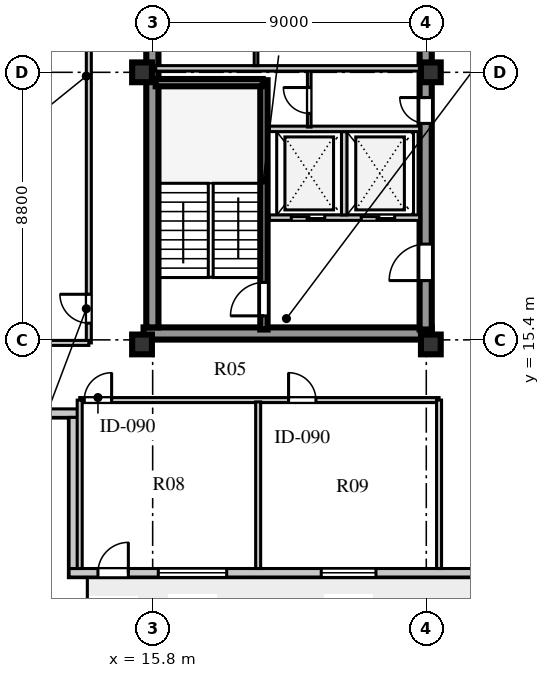
"""IFC4 building model, lengths in metres.
Left out: names, types, materials, properties, quantities, classifications, styles, units other than length and angle.
Written with IfcOpenShell. Run it as: python <this file> out.ifc"""

import sys

from ifc_helpers import new_model, si_unit, direction, frame, frame_2d, origin, origin_2d, place, context, subcontext, project, spatial, rectangle, extrude, element, fill, save


model = new_model("IFC4")
c1 = context("Model", 3, precision=1e-05, world=origin(), true_north=direction((0.0, 1.0)))
c2 = subcontext(c1, "Body", "Model", "MODEL_VIEW")
j1 = project(units=[si_unit("LENGTHUNIT", "METRE"), si_unit("PLANEANGLEUNIT", "RADIAN")], contexts=[c1])
p1 = place(None, origin())
s1 = spatial("IfcSite", under=j1, at=p1, CompositionType="ELEMENT")
p2 = place(p1, origin())
s2 = spatial("IfcBuilding", under=s1, at=p2, CompositionType="ELEMENT")
p3 = place(p2, frame((0.0, 0.0, 253.1)))
s3 = spatial("IfcBuildingStorey", under=s2, at=p3, CompositionType="ELEMENT", Elevation=253.1)
p4 = place(p3, frame((15.5, 15.61, 0.0), z_axis=(0.0, 0.0, 1.0), x_axis=(1.0, 0.0, 0.0)))
e1 = element("IfcWall", 1, at=p4, inside=s3, PredefinedType="SHEAR", context=c2, shape_type="SweptSolid", body=[
    extrude(rectangle(XDim=9.48, YDim=0.4, at=frame_2d((4.74, 0.0))), origin(), (0.0, 0.0, 1.0), 3.66),
])
p5 = place(p3, frame((15.79, 15.81, 0.0), z_axis=(0.0, 0.0, 1.0), x_axis=(0.0, 1.0, 0.0)))
e2 = element("IfcWall", 2, at=p5, inside=s3, PredefinedType="SHEAR", context=c2, shape_type="SweptSolid", body=[
    extrude(rectangle(XDim=25.63, YDim=0.4, at=frame_2d((12.815, 0.0))), origin(), (0.0, 0.0, 1.0), 3.66),
])
p6 = place(p3, frame((24.78, 15.74, 0.0), z_axis=(0.0, 0.0, 1.0), x_axis=(0.0, 1.0, 0.0)))
e3 = element("IfcWall", 3, at=p6, inside=s3, PredefinedType="SHEAR", context=c2, shape_type="SweptSolid", body=[
    extrude(rectangle(XDim=25.76, YDim=0.4, at=frame_2d((12.88, 0.0))), origin(), (0.0, 0.0, 1.0), 3.66),
])
p7 = place(p6, frame((1.61, 0.0, 0.0)))
e4 = element("IfcOpeningElement", 4, at=p7, cuts=e3, PredefinedType="OPENING", context=c2, shape_type="SweptSolid", body=[
    extrude(rectangle(XDim=1.2, YDim=2.1, at=frame_2d((0.6, 1.05))), frame((0.0, 0.21, 0.0), z_axis=(0.0, -1.0, 0.0), x_axis=(1.0, 0.0, 0.0)), (0.0, 0.0, 1.0), 0.42),
])
p8 = place(p6, frame((6.78, 0.0, 0.0)))
e5 = element("IfcOpeningElement", 5, at=p8, cuts=e3, PredefinedType="OPENING", context=c2, shape_type="SweptSolid", body=[
    extrude(rectangle(XDim=0.85, YDim=2.06, at=frame_2d((0.425, 1.03))), frame((0.0, 0.21, 0.0), z_axis=(0.0, -1.0, 0.0), x_axis=(1.0, 0.0, 0.0)), (0.0, 0.0, 1.0), 0.42),
])
p9 = place(p6, frame((12.11, 0.0, 0.0)))
e6 = element("IfcOpeningElement", 6, at=p9, cuts=e3, PredefinedType="OPENING", context=c2, shape_type="SweptSolid", body=[
    extrude(rectangle(XDim=1.5, YDim=2.12, at=frame_2d((0.75, 1.06))), frame((0.0, 0.21, 0.0), z_axis=(0.0, -1.0, 0.0), x_axis=(1.0, 0.0, 0.0)), (0.0, 0.0, 1.0), 0.42),
])
p10 = place(p6, frame((20.11, 0.0, 0.0)))
e7 = element("IfcOpeningElement", 7, at=p10, cuts=e3, PredefinedType="OPENING", context=c2, shape_type="SweptSolid", body=[
    extrude(rectangle(XDim=1.2, YDim=2.12, at=frame_2d((0.6, 1.06))), frame((0.0, 0.21, 0.0), z_axis=(0.0, -1.0, 0.0), x_axis=(1.0, 0.0, 0.0)), (0.0, 0.0, 1.0), 0.42),
])
p11 = place(p6, frame((24.01, 0.0, 0.0)))
e8 = element("IfcOpeningElement", 8, at=p11, cuts=e3, PredefinedType="OPENING", context=c2, shape_type="SweptSolid", body=[
    extrude(rectangle(XDim=0.95, YDim=2.1, at=frame_2d((0.475, 1.05))), frame((0.0, 0.21, 0.0), z_axis=(0.0, -1.0, 0.0), x_axis=(1.0, 0.0, 0.0)), (0.0, 0.0, 1.0), 0.42),
])
for number, where, z_axis, x_axis in (
    (9, (15.45, 15.25, 0.0), (0.0, 0.0, 1.0), (1.0, 0.0, 0.0)),
    (10, (15.45, 24.2, 0.0), (0.0, 0.0, 1.0), (1.0, 0.0, 0.0)),
    (11, (24.95, 15.25, 0.0), (0.0, 0.0, 1.0), (1.0, 0.0, 0.0)),
    (12, (24.95, 24.2, 0.0), (0.0, 0.0, 1.0), (1.0, 0.0, 0.0)),
):
    element("IfcColumn", number, at=place(p3, frame(where, z_axis=z_axis, x_axis=x_axis)), inside=s3, PredefinedType="COLUMN", context=c2, shape_type="SweptSolid", body=[
        extrude(rectangle(XDim=0.65, YDim=0.65, at=origin_2d()), origin(), (0.0, 0.0, 1.0), 3.66),
    ])
p12 = place(p3, frame((13.05, 7.74, 0.0), z_axis=(0.0, 0.0, 1.0), x_axis=(1.0, 0.0, 0.0)))
e13 = element("IfcWall", 13, at=p12, inside=s3, PredefinedType="STANDARD", context=c2, shape_type="SweptSolid", body=[
    extrude(rectangle(XDim=32.5, YDim=0.28, at=frame_2d((16.25, 0.0))), origin(), (0.0, 0.0, 1.0), 3.66),
])
p13 = place(p12, frame((0.95, 0.0, 0.0)))
e14 = element("IfcOpeningElement", 14, at=p13, cuts=e13, PredefinedType="OPENING", context=c2, shape_type="SweptSolid", body=[
    extrude(rectangle(XDim=1.0, YDim=2.05, at=frame_2d((0.5, 1.025))), frame((0.0, 0.15, 0.0), z_axis=(0.0, -1.0, 0.0), x_axis=(1.0, 0.0, 0.0)), (0.0, 0.0, 1.0), 0.3),
])
p14 = place(p12, frame((2.935, 0.0, 0.8)))
e15 = element("IfcOpeningElement", 15, at=p14, cuts=e13, PredefinedType="OPENING", context=c2, shape_type="SweptSolid", body=[
    extrude(rectangle(XDim=2.25, YDim=2.0, at=frame_2d((1.125, 1.0))), frame((0.0, 0.15, 0.0), z_axis=(0.0, -1.0, 0.0), x_axis=(1.0, 0.0, 0.0)), (0.0, 0.0, 1.0), 0.3),
])
p15 = place(p12, frame((8.295, 0.0, 0.8)))
e16 = element("IfcOpeningElement", 16, at=p15, cuts=e13, PredefinedType="OPENING", context=c2, shape_type="SweptSolid", body=[
    extrude(rectangle(XDim=1.8, YDim=2.0, at=frame_2d((0.9, 1.0))), frame((0.0, 0.15, 0.0), z_axis=(0.0, -1.0, 0.0), x_axis=(1.0, 0.0, 0.0)), (0.0, 0.0, 1.0), 0.3),
])
p16 = place(p12, frame((14.802, 0.0, 0.8)))
e17 = element("IfcOpeningElement", 17, at=p16, cuts=e13, PredefinedType="OPENING", context=c2, shape_type="SweptSolid", body=[
    extrude(rectangle(XDim=1.5, YDim=2.0, at=frame_2d((0.75, 1.0))), frame((0.0, 0.15, 0.0), z_axis=(0.0, -1.0, 0.0), x_axis=(1.0, 0.0, 0.0)), (0.0, 0.0, 1.0), 0.3),
])
p17 = place(p12, frame((20.988, 0.0, 0.8)))
e18 = element("IfcOpeningElement", 18, at=p17, cuts=e13, PredefinedType="OPENING", context=c2, shape_type="SweptSolid", body=[
    extrude(rectangle(XDim=1.2, YDim=1.75, at=frame_2d((0.6, 0.875))), frame((0.0, 0.15, 0.0), z_axis=(0.0, -1.0, 0.0), x_axis=(1.0, 0.0, 0.0)), (0.0, 0.0, 1.0), 0.3),
])
p18 = place(p12, frame((28.045, 0.0, 0.8)))
e19 = element("IfcOpeningElement", 19, at=p18, cuts=e13, PredefinedType="OPENING", context=c2, shape_type="SweptSolid", body=[
    extrude(rectangle(XDim=2.4, YDim=2.05, at=frame_2d((1.2, 1.025))), frame((0.0, 0.15, 0.0), z_axis=(0.0, -1.0, 0.0), x_axis=(1.0, 0.0, 0.0)), (0.0, 0.0, 1.0), 0.3),
])
p19 = place(p3, frame((7.8, 12.99, 0.0), z_axis=(0.0, 0.0, 1.0), x_axis=(1.0, 0.0, 0.0)))
e20 = element("IfcWall", 20, at=p19, inside=s3, PredefinedType="STANDARD", context=c2, shape_type="SweptSolid", body=[
    extrude(rectangle(XDim=5.53, YDim=0.28, at=frame_2d((2.765, 0.0))), origin(), (0.0, 0.0, 1.0), 3.66),
])
p20 = place(p3, frame((13.19, 12.85, 0.0), z_axis=(0.0, 0.0, 1.0), x_axis=(0.0, -1.0, 0.0)))
e21 = element("IfcWall", 21, at=p20, inside=s3, PredefinedType="STANDARD", context=c2, shape_type="SweptSolid", body=[
    extrude(rectangle(XDim=4.97, YDim=0.28, at=frame_2d((2.485, 0.0))), origin(), (0.0, 0.0, 1.0), 3.66),
])
p21 = place(p3, frame((19.46, 15.74, 0.0), z_axis=(0.0, 0.0, 1.0), x_axis=(0.0, 1.0, 0.0)))
e22 = element("IfcWall", 22, at=p21, inside=s3, PredefinedType="SHEAR", context=c2, shape_type="SweptSolid", body=[
    extrude(rectangle(XDim=8.2, YDim=0.24, at=frame_2d((4.1, 0.0))), origin(), (0.0, 0.0, 1.0), 3.9),
])
p22 = place(p21, frame((0.45, 0.0, 0.0)))
e23 = element("IfcOpeningElement", 23, at=p22, cuts=e22, PredefinedType="OPENING", context=c2, shape_type="SweptSolid", body=[
    extrude(rectangle(XDim=1.1, YDim=2.1, at=frame_2d((0.55, 1.05))), frame((0.0, 0.13, 0.0), z_axis=(0.0, -1.0, 0.0), x_axis=(1.0, 0.0, 0.0)), (0.0, 0.0, 1.0), 0.26),
])
p23 = place(p3, frame((15.9, 23.86, 0.0), z_axis=(0.0, 0.0, 1.0), x_axis=(1.0, 0.0, 0.0)))
e24 = element("IfcWall", 24, at=p23, inside=s3, PredefinedType="SHEAR", context=c2, shape_type="SweptSolid", body=[
    extrude(rectangle(XDim=3.52, YDim=0.24, at=frame_2d((1.76, 0.0))), origin(), (0.0, 0.0, 1.0), 3.9),
])
p24 = place(p3, frame((19.64, 19.42, 0.0), z_axis=(0.0, 0.0, 1.0), x_axis=(1.0, 0.0, 0.0)))
e25 = element("IfcWall", 25, at=p24, inside=s3, PredefinedType="SOLIDWALL", context=c2, shape_type="SweptSolid", body=[
    extrude(rectangle(XDim=4.94, YDim=0.18, at=frame_2d((2.47, 0.0))), origin(), (0.0, 0.0, 1.0), 3.66),
])
p25 = place(p24, frame((0.72, 0.0, 0.0)))
e26 = element("IfcOpeningElement", 26, at=p25, cuts=e25, PredefinedType="OPENING", context=c2, shape_type="SweptSolid", body=[
    extrude(rectangle(XDim=1.1, YDim=2.1, at=frame_2d((0.55, 1.05))), frame((0.0, 0.1, 0.0), z_axis=(0.0, -1.0, 0.0), x_axis=(1.0, 0.0, 0.0)), (0.0, 0.0, 1.0), 0.2),
])
p26 = place(p24, frame((3.02, 0.0, 0.0)))
e27 = element("IfcOpeningElement", 27, at=p26, cuts=e25, PredefinedType="OPENING", context=c2, shape_type="SweptSolid", body=[
    extrude(rectangle(XDim=1.1, YDim=2.1, at=frame_2d((0.55, 1.05))), frame((0.0, 0.1, 0.0), z_axis=(0.0, -1.0, 0.0), x_axis=(1.0, 0.0, 0.0)), (0.0, 0.0, 1.0), 0.2),
])
p27 = place(p3, frame((22.1, 19.51, 0.0), z_axis=(0.0, 0.0, 1.0), x_axis=(0.0, 1.0, 0.0)))
e28 = element("IfcWall", 28, at=p27, inside=s3, PredefinedType="SOLIDWALL", context=c2, shape_type="SweptSolid", body=[
    extrude(rectangle(XDim=2.74, YDim=0.18, at=frame_2d((1.37, 0.0))), origin(), (0.0, 0.0, 1.0), 3.66),
])
p28 = place(p3, frame((19.64, 22.34, 0.0), z_axis=(0.0, 0.0, 1.0), x_axis=(1.0, 0.0, 0.0)))
e29 = element("IfcWall", 29, at=p28, inside=s3, PredefinedType="SOLIDWALL", context=c2, shape_type="SweptSolid", body=[
    extrude(rectangle(XDim=4.94, YDim=0.18, at=frame_2d((2.47, 0.0))), origin(), (0.0, 0.0, 1.0), 3.66),
])
p29 = place(p3, frame((20.95, 22.4, 0.0), z_axis=(0.0, 0.0, 1.0), x_axis=(0.0, 1.0, 0.0)))
e30 = element("IfcWall", 30, at=p29, inside=s3, PredefinedType="PARTITIONING", context=c2, shape_type="SweptSolid", body=[
    extrude(rectangle(XDim=1.88, YDim=0.12, at=frame_2d((0.94, 0.0))), origin(), (0.0, 0.0, 1.0), 3.66),
])
p30 = place(p29, frame((0.45, 0.0, 0.0)))
e31 = element("IfcOpeningElement", 31, at=p30, cuts=e30, PredefinedType="OPENING", context=c2, shape_type="SweptSolid", body=[
    extrude(rectangle(XDim=0.85, YDim=2.06, at=frame_2d((0.425, 1.03))), frame((0.0, 0.07, 0.0), z_axis=(0.0, -1.0, 0.0), x_axis=(1.0, 0.0, 0.0)), (0.0, 0.0, 1.0), 0.14),
])
p31 = place(p3, frame((15.9, 24.33, 0.0), z_axis=(0.0, 0.0, 1.0), x_axis=(1.0, 0.0, 0.0)))
e32 = element("IfcWall", 32, at=p31, inside=s3, PredefinedType="SOLIDWALL", context=c2, shape_type="SweptSolid", body=[
    extrude(rectangle(XDim=8.68, YDim=0.18, at=frame_2d((4.34, 0.0))), origin(), (0.0, 0.0, 1.0), 3.06),
])
p32 = place(p3, frame((19.2, 24.42, 0.0), z_axis=(0.0, 0.0, 1.0), x_axis=(0.0, 1.0, 0.0)))
e33 = element("IfcWall", 33, at=p32, inside=s3, PredefinedType="PARTITIONING", context=c2, shape_type="SweptSolid", body=[
    extrude(rectangle(XDim=2.02, YDim=0.12, at=frame_2d((1.01, 0.0))), origin(), (0.0, 0.0, 1.0), 3.66),
])
p33 = place(p3, frame((13.4, 13.42, 0.0), z_axis=(0.0, 0.0, 1.0), x_axis=(1.0, 0.0, 0.0)))
e34 = element("IfcWall", 34, at=p33, inside=s3, PredefinedType="PARTITIONING", context=c2, shape_type="SweptSolid", body=[
    extrude(rectangle(XDim=11.82, YDim=0.165, at=frame_2d((5.91, 0.0))), origin(), (0.0, 0.0, 1.0), 3.66),
])
p34 = place(p33, frame((0.15, 0.0, 0.0)))
e35 = element("IfcOpeningElement", 35, at=p34, cuts=e34, PredefinedType="OPENING", context=c2, shape_type="SweptSolid", body=[
    extrude(rectangle(XDim=0.9, YDim=2.08, at=frame_2d((0.45, 1.04))), frame((0.0, 0.093, 0.0), z_axis=(0.0, -1.0, 0.0), x_axis=(1.0, 0.0, 0.0)), (0.0, 0.0, 1.0), 0.185),
])
p35 = place(p33, frame((6.87, 0.0, 0.0)))
e36 = element("IfcOpeningElement", 36, at=p35, cuts=e34, PredefinedType="OPENING", context=c2, shape_type="SweptSolid", body=[
    extrude(rectangle(XDim=0.9, YDim=2.08, at=frame_2d((0.45, 1.04))), frame((0.0, 0.093, 0.0), z_axis=(0.0, -1.0, 0.0), x_axis=(1.0, 0.0, 0.0)), (0.0, 0.0, 1.0), 0.185),
])
p36 = place(p3, frame((13.4, 7.88, 0.0), z_axis=(0.0, 0.0, 1.0), x_axis=(0.0, 1.0, 0.0)))
e37 = element("IfcWall", 37, at=p36, inside=s3, PredefinedType="PARTITIONING", context=c2, shape_type="SweptSolid", body=[
    extrude(rectangle(XDim=5.54, YDim=0.165, at=frame_2d((2.77, 0.0))), origin(), (0.0, 0.0, 1.0), 3.66),
])
p37 = place(p3, frame((25.22, 7.88, 0.0), z_axis=(0.0, 0.0, 1.0), x_axis=(0.0, 1.0, 0.0)))
e38 = element("IfcWall", 38, at=p37, inside=s3, PredefinedType="PARTITIONING", context=c2, shape_type="SweptSolid", body=[
    extrude(rectangle(XDim=5.54, YDim=0.165, at=frame_2d((2.77, 0.0))), origin(), (0.0, 0.0, 1.0), 3.21),
])
p38 = place(p3, frame((19.27, 7.88, 0.0), z_axis=(0.0, 0.0, 1.0), x_axis=(0.0, 1.0, 0.0)))
e39 = element("IfcWall", 39, at=p38, inside=s3, PredefinedType="PARTITIONING", context=c2, shape_type="SweptSolid", body=[
    extrude(rectangle(XDim=5.48, YDim=0.165, at=frame_2d((2.74, 0.0))), origin(), (0.0, 0.0, 1.0), 3.66),
])
p39 = place(p3, frame((13.7, 15.3, 0.0), z_axis=(0.0, 0.0, 1.0), x_axis=(0.0, 1.0, 0.0)))
e40 = element("IfcWall", 40, at=p39, inside=s3, PredefinedType="PARTITIONING", context=c2, shape_type="SweptSolid", body=[
    extrude(rectangle(XDim=26.6, YDim=0.165, at=frame_2d((13.3, 0.0))), origin(), (0.0, 0.0, 1.0), 3.66),
])
p40 = place(p39, frame((0.65, 0.0, 0.0)))
e41 = element("IfcOpeningElement", 41, at=p40, cuts=e40, PredefinedType="OPENING", context=c2, shape_type="SweptSolid", body=[
    extrude(rectangle(XDim=0.95, YDim=2.1, at=frame_2d((0.475, 1.05))), frame((0.0, 0.093, 0.0), z_axis=(0.0, -1.0, 0.0), x_axis=(1.0, 0.0, 0.0)), (0.0, 0.0, 1.0), 0.185),
])
p41 = place(p39, frame((15.95, 0.0, 0.0)))
e42 = element("IfcOpeningElement", 42, at=p41, cuts=e40, PredefinedType="OPENING", context=c2, shape_type="SweptSolid", body=[
    extrude(rectangle(XDim=0.95, YDim=2.1, at=frame_2d((0.475, 1.05))), frame((0.0, 0.093, 0.0), z_axis=(0.0, -1.0, 0.0), x_axis=(1.0, 0.0, 0.0)), (0.0, 0.0, 1.0), 0.185),
])
p42 = place(p3, frame((8.08, 15.3, 0.0), z_axis=(0.0, 0.0, 1.0), x_axis=(1.0, 0.0, 0.0)))
e43 = element("IfcWall", 43, at=p42, inside=s3, PredefinedType="PARTITIONING", context=c2, shape_type="SweptSolid", body=[
    extrude(rectangle(XDim=5.62, YDim=0.165, at=frame_2d((2.81, 0.0))), origin(), (0.0, 0.0, 1.0), 3.21),
])
p43 = place(p13, frame((1.0, 0.0, 0.0), z_axis=(0.0, 0.0, 1.0), x_axis=(-1.0, 0.0, 0.0)))
e44 = element("IfcDoor", 44, at=p43, inside=s3, OperationType="SINGLE_SWING_LEFT", PredefinedType="DOOR", context=c2, shape_type="SweptSolid", body=[
    extrude(rectangle(XDim=1.0, YDim=2.05, at=frame_2d((0.5, 1.025))), frame((0.0, 0.025, 0.0), z_axis=(0.0, -1.0, 0.0), x_axis=(1.0, 0.0, 0.0)), (0.0, 0.0, 1.0), 0.05),
])
fill(e14, e44)
p44 = place(p14, origin())
e45 = element("IfcWindow", 45, at=p44, inside=s3, PartitioningType="SINGLE_PANEL", PredefinedType="WINDOW", context=c2, shape_type="SweptSolid", body=[
    extrude(rectangle(XDim=2.25, YDim=2.0, at=frame_2d((1.125, 1.0))), frame((0.0, 0.03, 0.0), z_axis=(0.0, -1.0, 0.0), x_axis=(1.0, 0.0, 0.0)), (0.0, 0.0, 1.0), 0.06),
])
fill(e15, e45)
p45 = place(p15, origin())
e46 = element("IfcWindow", 46, at=p45, inside=s3, PartitioningType="SINGLE_PANEL", PredefinedType="WINDOW", context=c2, shape_type="SweptSolid", body=[
    extrude(rectangle(XDim=1.8, YDim=2.0, at=frame_2d((0.9, 1.0))), frame((0.0, 0.03, 0.0), z_axis=(0.0, -1.0, 0.0), x_axis=(1.0, 0.0, 0.0)), (0.0, 0.0, 1.0), 0.06),
])
fill(e16, e46)
p46 = place(p22, origin())
e47 = element("IfcDoor", 47, at=p46, inside=s3, OperationType="SINGLE_SWING_LEFT", PredefinedType="DOOR", context=c2, shape_type="SweptSolid", body=[
    extrude(rectangle(XDim=1.1, YDim=2.1, at=frame_2d((0.55, 1.05))), frame((0.0, 0.025, 0.0), z_axis=(0.0, -1.0, 0.0), x_axis=(1.0, 0.0, 0.0)), (0.0, 0.0, 1.0), 0.05),
])
fill(e23, e47)
p47 = place(p25, origin())
e48 = element("IfcDoor", 48, at=p47, inside=s3, OperationType="DOUBLE_DOOR_SLIDING", PredefinedType="DOOR", context=c2, shape_type="SweptSolid", body=[
    extrude(rectangle(XDim=1.1, YDim=2.1, at=frame_2d((0.55, 1.05))), frame((0.0, 0.025, 0.0), z_axis=(0.0, -1.0, 0.0), x_axis=(1.0, 0.0, 0.0)), (0.0, 0.0, 1.0), 0.05),
])
fill(e26, e48)
p48 = place(p26, origin())
e49 = element("IfcDoor", 49, at=p48, inside=s3, OperationType="DOUBLE_DOOR_SLIDING", PredefinedType="DOOR", context=c2, shape_type="SweptSolid", body=[
    extrude(rectangle(XDim=1.1, YDim=2.1, at=frame_2d((0.55, 1.05))), frame((0.0, 0.025, 0.0), z_axis=(0.0, -1.0, 0.0), x_axis=(1.0, 0.0, 0.0)), (0.0, 0.0, 1.0), 0.05),
])
fill(e27, e49)
p49 = place(p7, frame((1.2, 0.0, 0.0), z_axis=(0.0, 0.0, 1.0), x_axis=(-1.0, 0.0, 0.0)))
e50 = element("IfcDoor", 50, at=p49, inside=s3, OperationType="SINGLE_SWING_RIGHT", PredefinedType="DOOR", context=c2, shape_type="SweptSolid", body=[
    extrude(rectangle(XDim=1.2, YDim=2.1, at=frame_2d((0.6, 1.05))), frame((0.0, 0.025, 0.0), z_axis=(0.0, -1.0, 0.0), x_axis=(1.0, 0.0, 0.0)), (0.0, 0.0, 1.0), 0.05),
])
fill(e4, e50)
p50 = place(p30, origin())
e51 = element("IfcDoor", 51, at=p50, inside=s3, OperationType="SINGLE_SWING_RIGHT", PredefinedType="DOOR", context=c2, shape_type="SweptSolid", body=[
    extrude(rectangle(XDim=0.85, YDim=2.06, at=frame_2d((0.425, 1.03))), frame((0.0, 0.025, 0.0), z_axis=(0.0, -1.0, 0.0), x_axis=(1.0, 0.0, 0.0)), (0.0, 0.0, 1.0), 0.05),
])
fill(e31, e51)
p51 = place(p8, frame((0.85, 0.0, 0.0), z_axis=(0.0, 0.0, 1.0), x_axis=(-1.0, 0.0, 0.0)))
e52 = element("IfcDoor", 52, at=p51, inside=s3, OperationType="SINGLE_SWING_LEFT", PredefinedType="DOOR", context=c2, shape_type="SweptSolid", body=[
    extrude(rectangle(XDim=0.85, YDim=2.06, at=frame_2d((0.425, 1.03))), frame((0.0, 0.025, 0.0), z_axis=(0.0, -1.0, 0.0), x_axis=(1.0, 0.0, 0.0)), (0.0, 0.0, 1.0), 0.05),
])
fill(e5, e52)
p52 = place(p34, frame((0.9, 0.0, 0.0), z_axis=(0.0, 0.0, 1.0), x_axis=(-1.0, 0.0, 0.0)))
e53 = element("IfcDoor", 53, at=p52, inside=s3, OperationType="SINGLE_SWING_LEFT", PredefinedType="DOOR", context=c2, shape_type="SweptSolid", body=[
    extrude(rectangle(XDim=0.9, YDim=2.08, at=frame_2d((0.45, 1.04))), frame((0.0, 0.025, 0.0), z_axis=(0.0, -1.0, 0.0), x_axis=(1.0, 0.0, 0.0)), (0.0, 0.0, 1.0), 0.05),
])
fill(e35, e53)
p53 = place(p35, frame((0.9, 0.0, 0.0), z_axis=(0.0, 0.0, 1.0), x_axis=(-1.0, 0.0, 0.0)))
e54 = element("IfcDoor", 54, at=p53, inside=s3, OperationType="SINGLE_SWING_RIGHT", PredefinedType="DOOR", context=c2, shape_type="SweptSolid", body=[
    extrude(rectangle(XDim=0.9, YDim=2.08, at=frame_2d((0.45, 1.04))), frame((0.0, 0.025, 0.0), z_axis=(0.0, -1.0, 0.0), x_axis=(1.0, 0.0, 0.0)), (0.0, 0.0, 1.0), 0.05),
])
fill(e36, e54)
p54 = place(p40, frame((0.95, 0.0, 0.0), z_axis=(0.0, 0.0, 1.0), x_axis=(-1.0, 0.0, 0.0)))
e55 = element("IfcDoor", 55, at=p54, inside=s3, OperationType="SINGLE_SWING_LEFT", PredefinedType="DOOR", context=c2, shape_type="SweptSolid", body=[
    extrude(rectangle(XDim=0.95, YDim=2.1, at=frame_2d((0.475, 1.05))), frame((0.0, 0.025, 0.0), z_axis=(0.0, -1.0, 0.0), x_axis=(1.0, 0.0, 0.0)), (0.0, 0.0, 1.0), 0.05),
])
fill(e41, e55)
save(model, sys.argv[1])
